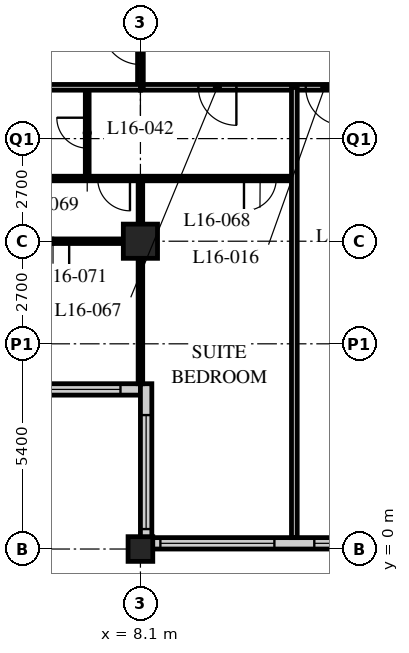
"""IFC4 building model, lengths in metres.
Left out: names, types, materials, properties, quantities, classifications, styles, units other than length and angle.
Written with IfcOpenShell. Run it as: python <this file> out.ifc"""

import sys

from ifc_helpers import new_model, si_unit, direction, frame, frame_2d, origin, origin_2d, place, context, subcontext, project, spatial, rectangle, hollow_rectangle, extrude, element, fill, save


model = new_model("IFC4")
c1 = context("Model", 3, precision=1e-05, world=origin(), true_north=direction((0.0, 1.0)))
c2 = subcontext(c1, "Body", "Model", "MODEL_VIEW")
j1 = project(units=[si_unit("LENGTHUNIT", "METRE"), si_unit("PLANEANGLEUNIT", "RADIAN")], contexts=[c1])
p1 = place(None, origin())
s1 = spatial("IfcSite", under=j1, at=p1, CompositionType="ELEMENT")
p2 = place(p1, origin())
s2 = spatial("IfcBuilding", under=s1, at=p2, CompositionType="ELEMENT")
p3 = place(p2, frame((0.0, 0.0, 67.0)))
s3 = spatial("IfcBuildingStorey", under=s2, at=p3, CompositionType="ELEMENT", Elevation=67.0)
p4 = place(p3, frame((8.1, 0.0, 0.0), z_axis=(0.0, 0.0, 1.0), x_axis=(1.0, 0.0, 0.0)))
e1 = element("IfcColumn", 1, at=p4, inside=s3, PredefinedType="COLUMN", context=c2, shape_type="SweptSolid", body=[
    extrude(hollow_rectangle(XDim=0.65, YDim=0.65, WallThickness=0.05, at=origin_2d()), origin(), (0.0, 0.0, 1.0), 3.4),
])
p5 = place(p3, frame((8.1, 8.1, 0.0), z_axis=(0.0, 0.0, 1.0), x_axis=(1.0, 0.0, 0.0)))
e2 = element("IfcColumn", 2, at=p5, inside=s3, PredefinedType="COLUMN", context=c2, shape_type="SweptSolid", body=[
    extrude(hollow_rectangle(XDim=0.9, YDim=0.9, WallThickness=0.09, at=origin_2d()), origin(), (0.0, 0.0, 1.0), 3.4),
])
p6 = place(p3, frame((8.4, 0.15, 0.0), z_axis=(0.0, 0.0, 1.0), x_axis=(1.0, 0.0, 0.0)))
e3 = element("IfcWall", 3, at=p6, inside=s3, PredefinedType="SOLIDWALL", context=c2, shape_type="SweptSolid", body=[
    extrude(rectangle(XDim=40.2, YDim=0.3, at=frame_2d((20.1, 0.0))), origin(), (0.0, 0.0, 1.0), 3.19),
])
p7 = place(p6, frame((0.225, 0.0, 0.9)))
e4 = element("IfcOpeningElement", 4, at=p7, cuts=e3, PredefinedType="OPENING", context=c2, shape_type="SweptSolid", body=[
    extrude(rectangle(XDim=3.0, YDim=2.0, at=frame_2d((1.5, 1.0))), frame((0.0, 0.16, 0.0), z_axis=(0.0, -1.0, 0.0), x_axis=(1.0, 0.0, 0.0)), (0.0, 0.0, 1.0), 0.32),
])
p8 = place(p6, frame((4.275, 0.0, 0.9)))
e5 = element("IfcOpeningElement", 5, at=p8, cuts=e3, PredefinedType="OPENING", context=c2, shape_type="SweptSolid", body=[
    extrude(rectangle(XDim=3.0, YDim=2.0, at=frame_2d((1.5, 1.0))), frame((0.0, 0.16, 0.0), z_axis=(0.0, -1.0, 0.0), x_axis=(1.0, 0.0, 0.0)), (0.0, 0.0, 1.0), 0.32),
])
p9 = place(p6, frame((8.325, 0.0, 0.9)))
e6 = element("IfcOpeningElement", 6, at=p9, cuts=e3, PredefinedType="OPENING", context=c2, shape_type="SweptSolid", body=[
    extrude(rectangle(XDim=3.0, YDim=2.0, at=frame_2d((1.5, 1.0))), frame((0.0, 0.16, 0.0), z_axis=(0.0, -1.0, 0.0), x_axis=(1.0, 0.0, 0.0)), (0.0, 0.0, 1.0), 0.32),
])
p10 = place(p6, frame((12.375, 0.0, 0.9)))
e7 = element("IfcOpeningElement", 7, at=p10, cuts=e3, PredefinedType="OPENING", context=c2, shape_type="SweptSolid", body=[
    extrude(rectangle(XDim=3.0, YDim=2.0, at=frame_2d((1.5, 1.0))), frame((0.0, 0.16, 0.0), z_axis=(0.0, -1.0, 0.0), x_axis=(1.0, 0.0, 0.0)), (0.0, 0.0, 1.0), 0.32),
])
p11 = place(p6, frame((16.425, 0.0, 0.9)))
e8 = element("IfcOpeningElement", 8, at=p11, cuts=e3, PredefinedType="OPENING", context=c2, shape_type="SweptSolid", body=[
    extrude(rectangle(XDim=3.0, YDim=2.0, at=frame_2d((1.5, 1.0))), frame((0.0, 0.16, 0.0), z_axis=(0.0, -1.0, 0.0), x_axis=(1.0, 0.0, 0.0)), (0.0, 0.0, 1.0), 0.32),
])
p12 = place(p6, frame((20.475, 0.0, 0.9)))
e9 = element("IfcOpeningElement", 9, at=p12, cuts=e3, PredefinedType="OPENING", context=c2, shape_type="SweptSolid", body=[
    extrude(rectangle(XDim=3.0, YDim=2.0, at=frame_2d((1.5, 1.0))), frame((0.0, 0.16, 0.0), z_axis=(0.0, -1.0, 0.0), x_axis=(1.0, 0.0, 0.0)), (0.0, 0.0, 1.0), 0.32),
])
p13 = place(p6, frame((24.525, 0.0, 0.9)))
e10 = element("IfcOpeningElement", 10, at=p13, cuts=e3, PredefinedType="OPENING", context=c2, shape_type="SweptSolid", body=[
    extrude(rectangle(XDim=3.0, YDim=2.0, at=frame_2d((1.5, 1.0))), frame((0.0, 0.16, 0.0), z_axis=(0.0, -1.0, 0.0), x_axis=(1.0, 0.0, 0.0)), (0.0, 0.0, 1.0), 0.32),
])
p14 = place(p6, frame((28.575, 0.0, 0.9)))
e11 = element("IfcOpeningElement", 11, at=p14, cuts=e3, PredefinedType="OPENING", context=c2, shape_type="SweptSolid", body=[
    extrude(rectangle(XDim=3.0, YDim=2.0, at=frame_2d((1.5, 1.0))), frame((0.0, 0.16, 0.0), z_axis=(0.0, -1.0, 0.0), x_axis=(1.0, 0.0, 0.0)), (0.0, 0.0, 1.0), 0.32),
])
p15 = place(p6, frame((32.625, 0.0, 0.9)))
e12 = element("IfcOpeningElement", 12, at=p15, cuts=e3, PredefinedType="OPENING", context=c2, shape_type="SweptSolid", body=[
    extrude(rectangle(XDim=3.0, YDim=2.0, at=frame_2d((1.5, 1.0))), frame((0.0, 0.16, 0.0), z_axis=(0.0, -1.0, 0.0), x_axis=(1.0, 0.0, 0.0)), (0.0, 0.0, 1.0), 0.32),
])
p16 = place(p6, frame((36.675, 0.0, 0.9)))
e13 = element("IfcOpeningElement", 13, at=p16, cuts=e3, PredefinedType="OPENING", context=c2, shape_type="SweptSolid", body=[
    extrude(rectangle(XDim=3.0, YDim=2.0, at=frame_2d((1.5, 1.0))), frame((0.0, 0.16, 0.0), z_axis=(0.0, -1.0, 0.0), x_axis=(1.0, 0.0, 0.0)), (0.0, 0.0, 1.0), 0.32),
])
p17 = place(p3, frame((4.35, 4.2, 0.0), z_axis=(0.0, 0.0, 1.0), x_axis=(1.0, 0.0, 0.0)))
e14 = element("IfcWall", 14, at=p17, inside=s3, PredefinedType="SOLIDWALL", context=c2, shape_type="SweptSolid", body=[
    extrude(rectangle(XDim=3.75, YDim=0.3, at=frame_2d((1.875, 0.0))), origin(), (0.0, 0.0, 1.0), 3.19),
])
p18 = place(p17, frame((0.225, 0.0, 0.9)))
e15 = element("IfcOpeningElement", 15, at=p18, cuts=e14, PredefinedType="OPENING", context=c2, shape_type="SweptSolid", body=[
    extrude(rectangle(XDim=3.0, YDim=1.5, at=frame_2d((1.5, 0.75))), frame((0.0, 0.16, 0.0), z_axis=(0.0, -1.0, 0.0), x_axis=(1.0, 0.0, 0.0)), (0.0, 0.0, 1.0), 0.32),
])
p19 = place(p3, frame((8.25, 4.35, 0.0), z_axis=(0.0, 0.0, 1.0), x_axis=(0.0, -1.0, 0.0)))
e16 = element("IfcWall", 16, at=p19, inside=s3, PredefinedType="SOLIDWALL", context=c2, shape_type="SweptSolid", body=[
    extrude(rectangle(XDim=4.35, YDim=0.3, at=frame_2d((2.175, 0.0))), origin(), (0.0, 0.0, 1.0), 3.19),
])
p20 = place(p19, frame((0.825, 0.0, 0.9)))
e17 = element("IfcOpeningElement", 17, at=p20, cuts=e16, PredefinedType="OPENING", context=c2, shape_type="SweptSolid", body=[
    extrude(rectangle(XDim=3.0, YDim=1.5, at=frame_2d((1.5, 0.75))), frame((0.0, 0.16, 0.0), z_axis=(0.0, -1.0, 0.0), x_axis=(1.0, 0.0, 0.0)), (0.0, 0.0, 1.0), 0.32),
])
p21 = place(p3, frame((8.1, 12.15, 0.0), z_axis=(0.0, 0.0, 1.0), x_axis=(1.0, 0.0, 0.0)))
e18 = element("IfcWall", 18, at=p21, inside=s3, PredefinedType="PARTITIONING", context=c2, shape_type="SweptSolid", body=[
    extrude(rectangle(XDim=36.45, YDim=0.15, at=frame_2d((18.225, 0.0))), origin(), (0.0, 0.0, 1.0), 3.19),
])
p22 = place(p21, frame((4.35, 0.0, 0.0)))
e19 = element("IfcOpeningElement", 19, at=p22, cuts=e18, PredefinedType="OPENING", context=c2, shape_type="SweptSolid", body=[
    extrude(rectangle(XDim=1.0, YDim=2.1, at=frame_2d((0.5, 1.05))), frame((0.0, 0.085, 0.0), z_axis=(0.0, -1.0, 0.0), x_axis=(1.0, 0.0, 0.0)), (0.0, 0.0, 1.0), 0.17),
])
p23 = place(p21, frame((10.55, 0.0, 0.0)))
e20 = element("IfcOpeningElement", 20, at=p23, cuts=e18, PredefinedType="OPENING", context=c2, shape_type="SweptSolid", body=[
    extrude(rectangle(XDim=1.0, YDim=2.1, at=frame_2d((0.5, 1.05))), frame((0.0, 0.085, 0.0), z_axis=(0.0, -1.0, 0.0), x_axis=(1.0, 0.0, 0.0)), (0.0, 0.0, 1.0), 0.17),
])
p24 = place(p21, frame((14.6, 0.0, 0.0)))
e21 = element("IfcOpeningElement", 21, at=p24, cuts=e18, PredefinedType="OPENING", context=c2, shape_type="SweptSolid", body=[
    extrude(rectangle(XDim=1.0, YDim=2.1, at=frame_2d((0.5, 1.05))), frame((0.0, 0.085, 0.0), z_axis=(0.0, -1.0, 0.0), x_axis=(1.0, 0.0, 0.0)), (0.0, 0.0, 1.0), 0.17),
])
p25 = place(p21, frame((18.65, 0.0, 0.0)))
e22 = element("IfcOpeningElement", 22, at=p25, cuts=e18, PredefinedType="OPENING", context=c2, shape_type="SweptSolid", body=[
    extrude(rectangle(XDim=1.0, YDim=2.1, at=frame_2d((0.5, 1.05))), frame((0.0, 0.085, 0.0), z_axis=(0.0, -1.0, 0.0), x_axis=(1.0, 0.0, 0.0)), (0.0, 0.0, 1.0), 0.17),
])
p26 = place(p21, frame((22.7, 0.0, 0.0)))
e23 = element("IfcOpeningElement", 23, at=p26, cuts=e18, PredefinedType="OPENING", context=c2, shape_type="SweptSolid", body=[
    extrude(rectangle(XDim=1.0, YDim=2.1, at=frame_2d((0.5, 1.05))), frame((0.0, 0.085, 0.0), z_axis=(0.0, -1.0, 0.0), x_axis=(1.0, 0.0, 0.0)), (0.0, 0.0, 1.0), 0.17),
])
p27 = place(p21, frame((24.6, 0.0, 0.0)))
e24 = element("IfcOpeningElement", 24, at=p27, cuts=e18, PredefinedType="OPENING", context=c2, shape_type="SweptSolid", body=[
    extrude(rectangle(XDim=1.0, YDim=2.1, at=frame_2d((0.5, 1.05))), frame((0.0, 0.085, 0.0), z_axis=(0.0, -1.0, 0.0), x_axis=(1.0, 0.0, 0.0)), (0.0, 0.0, 1.0), 0.17),
])
p28 = place(p21, frame((30.8, 0.0, 0.0)))
e25 = element("IfcOpeningElement", 25, at=p28, cuts=e18, PredefinedType="OPENING", context=c2, shape_type="SweptSolid", body=[
    extrude(rectangle(XDim=1.0, YDim=2.1, at=frame_2d((0.5, 1.05))), frame((0.0, 0.085, 0.0), z_axis=(0.0, -1.0, 0.0), x_axis=(1.0, 0.0, 0.0)), (0.0, 0.0, 1.0), 0.17),
])
p29 = place(p21, frame((1.525, 0.0, 0.0)))
e26 = element("IfcOpeningElement", 26, at=p29, cuts=e18, PredefinedType="OPENING", context=c2, shape_type="SweptSolid", body=[
    extrude(rectangle(XDim=1.0, YDim=2.1, at=frame_2d((0.5, 1.05))), frame((0.0, 0.085, 0.0), z_axis=(0.0, -1.0, 0.0), x_axis=(1.0, 0.0, 0.0)), (0.0, 0.0, 1.0), 0.17),
])
p30 = place(p21, frame((33.925, 0.0, 0.0)))
e27 = element("IfcOpeningElement", 27, at=p30, cuts=e18, PredefinedType="OPENING", context=c2, shape_type="SweptSolid", body=[
    extrude(rectangle(XDim=1.0, YDim=2.1, at=frame_2d((0.5, 1.05))), frame((0.0, 0.085, 0.0), z_axis=(0.0, -1.0, 0.0), x_axis=(1.0, 0.0, 0.0)), (0.0, 0.0, 1.0), 0.17),
])
p31 = place(p3, frame((8.1, 12.15, 0.0), z_axis=(0.0, 0.0, 1.0), x_axis=(0.0, 1.0, 0.0)))
e28 = element("IfcWall", 28, at=p31, inside=s3, PredefinedType="PARTITIONING", context=c2, shape_type="SweptSolid", body=[
    extrude(rectangle(XDim=30.15, YDim=0.15, at=frame_2d((15.075, 0.0))), origin(), (0.0, 0.0, 1.0), 2.578),
])
p32 = place(p31, frame((0.6, 0.0, 0.0)))
e29 = element("IfcOpeningElement", 29, at=p32, cuts=e28, PredefinedType="OPENING", context=c2, shape_type="SweptSolid", body=[
    extrude(rectangle(XDim=1.0, YDim=2.1, at=frame_2d((0.5, 1.05))), frame((0.0, 0.085, 0.0), z_axis=(0.0, -1.0, 0.0), x_axis=(1.0, 0.0, 0.0)), (0.0, 0.0, 1.0), 0.17),
])
p33 = place(p31, frame((6.8, 0.0, 0.0)))
e30 = element("IfcOpeningElement", 30, at=p33, cuts=e28, PredefinedType="OPENING", context=c2, shape_type="SweptSolid", body=[
    extrude(rectangle(XDim=1.0, YDim=2.1, at=frame_2d((0.5, 1.05))), frame((0.0, 0.085, 0.0), z_axis=(0.0, -1.0, 0.0), x_axis=(1.0, 0.0, 0.0)), (0.0, 0.0, 1.0), 0.17),
])
p34 = place(p31, frame((8.7, 0.0, 0.0)))
e31 = element("IfcOpeningElement", 31, at=p34, cuts=e28, PredefinedType="OPENING", context=c2, shape_type="SweptSolid", body=[
    extrude(rectangle(XDim=1.0, YDim=2.1, at=frame_2d((0.5, 1.05))), frame((0.0, 0.085, 0.0), z_axis=(0.0, -1.0, 0.0), x_axis=(1.0, 0.0, 0.0)), (0.0, 0.0, 1.0), 0.17),
])
p35 = place(p31, frame((14.6, 0.0, 0.0)))
e32 = element("IfcOpeningElement", 32, at=p35, cuts=e28, PredefinedType="OPENING", context=c2, shape_type="SweptSolid", body=[
    extrude(rectangle(XDim=1.0, YDim=2.1, at=frame_2d((0.5, 1.05))), frame((0.0, 0.085, 0.0), z_axis=(0.0, -1.0, 0.0), x_axis=(1.0, 0.0, 0.0)), (0.0, 0.0, 1.0), 0.17),
])
p36 = place(p31, frame((21.65, 0.0, 0.0)))
e33 = element("IfcOpeningElement", 33, at=p36, cuts=e28, PredefinedType="OPENING", context=c2, shape_type="SweptSolid", body=[
    extrude(rectangle(XDim=1.0, YDim=2.1, at=frame_2d((0.5, 1.05))), frame((0.0, 0.085, 0.0), z_axis=(0.0, -1.0, 0.0), x_axis=(1.0, 0.0, 0.0)), (0.0, 0.0, 1.0), 0.17),
])
p37 = place(p31, frame((26.75, 0.0, 0.0)))
e34 = element("IfcOpeningElement", 34, at=p37, cuts=e28, PredefinedType="OPENING", context=c2, shape_type="SweptSolid", body=[
    extrude(rectangle(XDim=1.0, YDim=2.1, at=frame_2d((0.5, 1.05))), frame((0.0, 0.085, 0.0), z_axis=(0.0, -1.0, 0.0), x_axis=(1.0, 0.0, 0.0)), (0.0, 0.0, 1.0), 0.17),
])
p38 = place(p3, frame((6.7, 12.15, 0.0), z_axis=(0.0, 0.0, 1.0), x_axis=(0.0, -1.0, 0.0)))
e35 = element("IfcWall", 35, at=p38, inside=s3, PredefinedType="PARTITIONING", context=c2, shape_type="SweptSolid", body=[
    extrude(rectangle(XDim=2.4, YDim=0.1, at=frame_2d((1.2, 0.0))), origin(), (0.0, 0.0, 1.0), 3.19),
])
p39 = place(p38, frame((0.8, 0.0, 0.0)))
e36 = element("IfcOpeningElement", 36, at=p39, cuts=e35, PredefinedType="OPENING", context=c2, shape_type="SweptSolid", body=[
    extrude(rectangle(XDim=0.8, YDim=2.1, at=frame_2d((0.4, 1.05))), frame((0.0, 0.06, 0.0), z_axis=(0.0, -1.0, 0.0), x_axis=(1.0, 0.0, 0.0)), (0.0, 0.0, 1.0), 0.12),
])
p40 = place(p3, frame((4.1, 9.75, 0.0), z_axis=(0.0, 0.0, 1.0), x_axis=(1.0, 0.0, 0.0)))
e37 = element("IfcWall", 37, at=p40, inside=s3, PredefinedType="PARTITIONING", context=c2, shape_type="SweptSolid", body=[
    extrude(rectangle(XDim=8.05, YDim=0.12, at=frame_2d((4.025, 0.0))), origin(), (0.0, 0.0, 1.0), 3.19),
])
p41 = place(p40, frame((6.725, 0.0, 0.0)))
e38 = element("IfcOpeningElement", 38, at=p41, cuts=e37, PredefinedType="OPENING", context=c2, shape_type="SweptSolid", body=[
    extrude(rectangle(XDim=0.85, YDim=2.1, at=frame_2d((0.425, 1.05))), frame((0.0, 0.07, 0.0), z_axis=(0.0, -1.0, 0.0), x_axis=(1.0, 0.0, 0.0)), (0.0, 0.0, 1.0), 0.14),
])
p42 = place(p40, frame((2.875, 0.0, 0.0)))
e39 = element("IfcOpeningElement", 39, at=p42, cuts=e37, PredefinedType="OPENING", context=c2, shape_type="SweptSolid", body=[
    extrude(rectangle(XDim=0.85, YDim=2.1, at=frame_2d((0.425, 1.05))), frame((0.0, 0.07, 0.0), z_axis=(0.0, -1.0, 0.0), x_axis=(1.0, 0.0, 0.0)), (0.0, 0.0, 1.0), 0.14),
])
p43 = place(p3, frame((8.1, 9.75, 0.0), z_axis=(0.0, 0.0, 1.0), x_axis=(0.0, -1.0, 0.0)))
e40 = element("IfcWall", 40, at=p43, inside=s3, PredefinedType="PARTITIONING", context=c2, shape_type="SweptSolid", body=[
    extrude(rectangle(XDim=5.4, YDim=0.12, at=frame_2d((2.7, 0.0))), origin(), (0.0, 0.0, 1.0), 2.578),
])
p44 = place(p3, frame((8.1, 8.1, 0.0), z_axis=(0.0, 0.0, 1.0), x_axis=(-1.0, 0.0, 0.0)))
e41 = element("IfcWall", 41, at=p44, inside=s3, PredefinedType="PARTITIONING", context=c2, shape_type="SweptSolid", body=[
    extrude(rectangle(XDim=3.75, YDim=0.12, at=frame_2d((1.875, 0.0))), origin(), (0.0, 0.0, 1.0), 2.578),
])
p45 = place(p44, frame((1.875, 0.0, 0.0)))
e42 = element("IfcOpeningElement", 42, at=p45, cuts=e41, PredefinedType="OPENING", context=c2, shape_type="SweptSolid", body=[
    extrude(rectangle(XDim=0.85, YDim=2.1, at=frame_2d((0.425, 1.05))), frame((0.0, 0.07, 0.0), z_axis=(0.0, -1.0, 0.0), x_axis=(1.0, 0.0, 0.0)), (0.0, 0.0, 1.0), 0.14),
])
p46 = place(p3, frame((0.3, 12.15, 0.0), z_axis=(0.0, 0.0, 1.0), x_axis=(1.0, 0.0, 0.0)))
e43 = element("IfcWall", 43, at=p46, inside=s3, PredefinedType="PARTITIONING", context=c2, shape_type="SweptSolid", body=[
    extrude(rectangle(XDim=7.8, YDim=0.15, at=frame_2d((3.9, 0.0))), origin(), (0.0, 0.0, 1.0), 3.19),
])
p47 = place(p3, frame((12.15, 12.15, 0.0), z_axis=(0.0, 0.0, 1.0), x_axis=(0.0, -1.0, 0.0)))
e44 = element("IfcWall", 44, at=p47, inside=s3, PredefinedType="PARTITIONING", context=c2, shape_type="SweptSolid", body=[
    extrude(rectangle(XDim=11.85, YDim=0.15, at=frame_2d((5.925, 0.0))), origin(), (0.0, 0.0, 1.0), 3.19),
])
p48 = place(p7, origin())
e45 = element("IfcWindow", 45, at=p48, inside=s3, PartitioningType="SINGLE_PANEL", PredefinedType="WINDOW", context=c2, shape_type="SweptSolid", body=[
    extrude(rectangle(XDim=3.0, YDim=2.0, at=frame_2d((1.5, 1.0))), frame((0.0, 0.03, 0.0), z_axis=(0.0, -1.0, 0.0), x_axis=(1.0, 0.0, 0.0)), (0.0, 0.0, 1.0), 0.06),
])
fill(e4, e45)
p49 = place(p8, origin())
e46 = element("IfcWindow", 46, at=p49, inside=s3, PartitioningType="SINGLE_PANEL", PredefinedType="WINDOW", context=c2, shape_type="SweptSolid", body=[
    extrude(rectangle(XDim=3.0, YDim=2.0, at=frame_2d((1.5, 1.0))), frame((0.0, 0.03, 0.0), z_axis=(0.0, -1.0, 0.0), x_axis=(1.0, 0.0, 0.0)), (0.0, 0.0, 1.0), 0.06),
])
fill(e5, e46)
p50 = place(p18, origin())
e47 = element("IfcWindow", 47, at=p50, inside=s3, PartitioningType="SINGLE_PANEL", PredefinedType="WINDOW", context=c2, shape_type="SweptSolid", body=[
    extrude(rectangle(XDim=3.0, YDim=1.5, at=frame_2d((1.5, 0.75))), frame((0.0, 0.03, 0.0), z_axis=(0.0, -1.0, 0.0), x_axis=(1.0, 0.0, 0.0)), (0.0, 0.0, 1.0), 0.06),
])
fill(e15, e47)
p51 = place(p20, origin())
e48 = element("IfcWindow", 48, at=p51, inside=s3, PartitioningType="SINGLE_PANEL", PredefinedType="WINDOW", context=c2, shape_type="SweptSolid", body=[
    extrude(rectangle(XDim=3.0, YDim=1.5, at=frame_2d((1.5, 0.75))), frame((0.0, 0.03, 0.0), z_axis=(0.0, -1.0, 0.0), x_axis=(1.0, 0.0, 0.0)), (0.0, 0.0, 1.0), 0.06),
])
fill(e17, e48)
p52 = place(p22, origin())
e49 = element("IfcDoor", 49, at=p52, inside=s3, OperationType="SINGLE_SWING_LEFT", PredefinedType="DOOR", context=c2, shape_type="SweptSolid", body=[
    extrude(rectangle(XDim=1.0, YDim=2.1, at=frame_2d((0.5, 1.05))), frame((0.0, 0.025, 0.0), z_axis=(0.0, -1.0, 0.0), x_axis=(1.0, 0.0, 0.0)), (0.0, 0.0, 1.0), 0.05),
])
fill(e19, e49)
p53 = place(p32, origin())
e50 = element("IfcDoor", 50, at=p53, inside=s3, OperationType="SINGLE_SWING_RIGHT", PredefinedType="DOOR", context=c2, shape_type="SweptSolid", body=[
    extrude(rectangle(XDim=1.0, YDim=2.1, at=frame_2d((0.5, 1.05))), frame((0.0, 0.025, 0.0), z_axis=(0.0, -1.0, 0.0), x_axis=(1.0, 0.0, 0.0)), (0.0, 0.0, 1.0), 0.05),
])
fill(e29, e50)
p54 = place(p29, origin())
e51 = element("IfcDoor", 51, at=p54, inside=s3, OperationType="SINGLE_SWING_LEFT", PredefinedType="DOOR", context=c2, shape_type="SweptSolid", body=[
    extrude(rectangle(XDim=1.0, YDim=2.1, at=frame_2d((0.5, 1.05))), frame((0.0, 0.025, 0.0), z_axis=(0.0, -1.0, 0.0), x_axis=(1.0, 0.0, 0.0)), (0.0, 0.0, 1.0), 0.05),
])
fill(e26, e51)
p55 = place(p41, origin())
e52 = element("IfcDoor", 52, at=p55, inside=s3, OperationType="SINGLE_SWING_RIGHT", PredefinedType="DOOR", context=c2, shape_type="SweptSolid", body=[
    extrude(rectangle(XDim=0.85, YDim=2.1, at=frame_2d((0.425, 1.05))), frame((0.0, 0.025, 0.0), z_axis=(0.0, -1.0, 0.0), x_axis=(1.0, 0.0, 0.0)), (0.0, 0.0, 1.0), 0.05),
])
fill(e38, e52)
p56 = place(p39, origin())
e53 = element("IfcDoor", 53, at=p56, inside=s3, OperationType="SINGLE_SWING_RIGHT", PredefinedType="DOOR", context=c2, shape_type="SweptSolid", body=[
    extrude(rectangle(XDim=0.8, YDim=2.1, at=frame_2d((0.4, 1.05))), frame((0.0, 0.025, 0.0), z_axis=(0.0, -1.0, 0.0), x_axis=(1.0, 0.0, 0.0)), (0.0, 0.0, 1.0), 0.05),
])
fill(e36, e53)
p57 = place(p42, origin())
e54 = element("IfcDoor", 54, at=p57, inside=s3, OperationType="SINGLE_SWING_LEFT", PredefinedType="DOOR", context=c2, shape_type="SweptSolid", body=[
    extrude(rectangle(XDim=0.85, YDim=2.1, at=frame_2d((0.425, 1.05))), frame((0.0, 0.025, 0.0), z_axis=(0.0, -1.0, 0.0), x_axis=(1.0, 0.0, 0.0)), (0.0, 0.0, 1.0), 0.05),
])
fill(e39, e54)
p58 = place(p45, origin())
e55 = element("IfcDoor", 55, at=p58, inside=s3, OperationType="SINGLE_SWING_LEFT", PredefinedType="DOOR", context=c2, shape_type="SweptSolid", body=[
    extrude(rectangle(XDim=0.85, YDim=2.1, at=frame_2d((0.425, 1.05))), frame((0.0, 0.025, 0.0), z_axis=(0.0, -1.0, 0.0), x_axis=(1.0, 0.0, 0.0)), (0.0, 0.0, 1.0), 0.05),
])
fill(e42, e55)
save(model, sys.argv[1])
